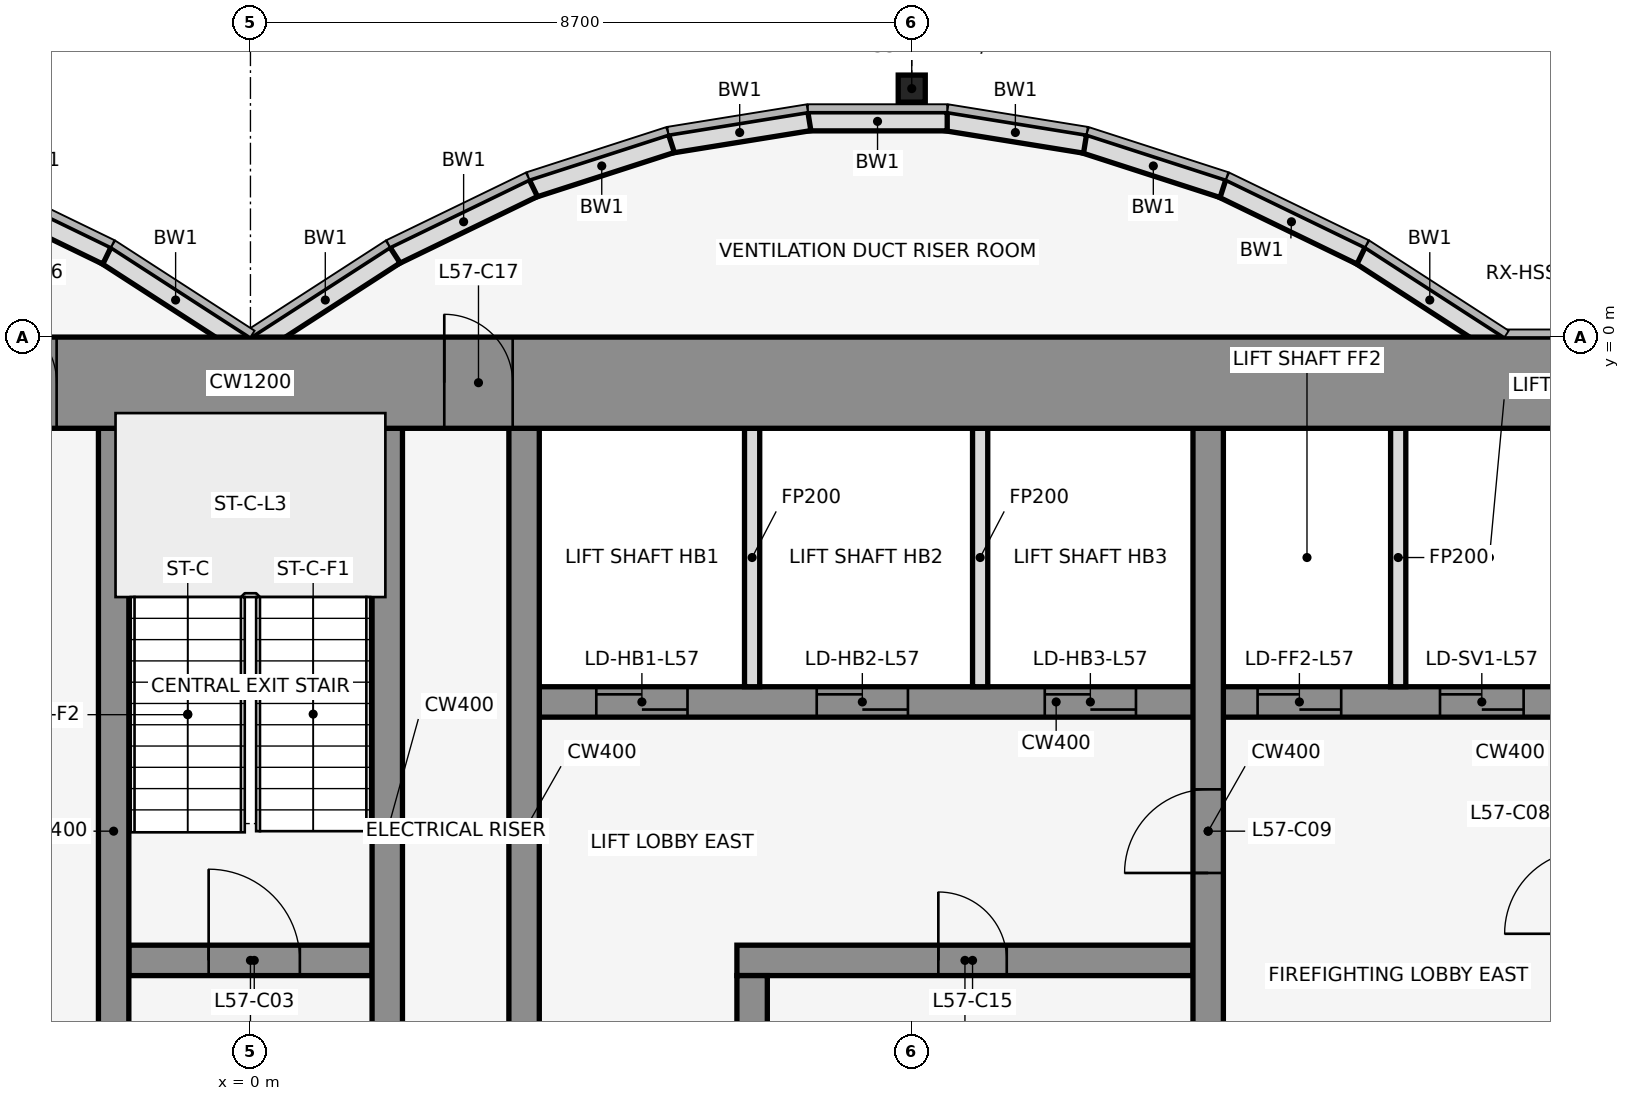
"""IFC4 building model, lengths in metres.
Left out: names, types, materials, properties, quantities, classifications, styles, units other than length and angle.
Written with IfcOpenShell. Run it as: python <this file> out.ifc"""

import sys

from ifc_helpers import new_model, si_unit, direction, frame, frame_2d, origin, origin_2d, place, context, subcontext, project, spatial, rectangle, hollow_rectangle, extrude, element, fill, save


model = new_model("IFC4")
c1 = context("Model", 3, precision=1e-05, world=origin(), true_north=direction((0.0, 1.0)))
c2 = subcontext(c1, "Body", "Model", "MODEL_VIEW")
j1 = project(units=[si_unit("LENGTHUNIT", "METRE"), si_unit("PLANEANGLEUNIT", "RADIAN")], contexts=[c1])
p1 = place(None, origin())
s1 = spatial("IfcSite", under=j1, at=p1, CompositionType="ELEMENT")
p2 = place(p1, origin())
s2 = spatial("IfcBuilding", under=s1, at=p2, CompositionType="ELEMENT")
p3 = place(p2, frame((0.0, 0.0, 254.0)))
s3 = spatial("IfcBuildingStorey", under=s2, at=p3, CompositionType="ELEMENT", Elevation=254.0)
p4 = place(p3, frame((8.7, 3.269, 0.0), z_axis=(0.0, 0.0, 1.0), x_axis=(1.0, 0.0, 0.0)))
e1 = element("IfcColumn", 1, at=p4, inside=s3, PredefinedType="COLUMN", context=c2, shape_type="SweptSolid", body=[
    extrude(hollow_rectangle(XDim=0.356, YDim=0.356, WallThickness=0.012, at=origin_2d()), origin(), (0.0, 0.0, 1.0), 4.2),
])
p5 = place(p3, frame((16.432, -0.105, 0.0), z_axis=(0.0, 0.0, 1.0), x_axis=(-0.83981312244, 0.542875602121, 0.0)))
e2 = element("IfcWall", 2, at=p5, inside=s3, PredefinedType="STANDARD", context=c2, shape_type="SweptSolid", body=[
    extrude(rectangle(XDim=2.183, YDim=0.25, at=frame_2d((1.091, 0.0))), origin(), (0.0, 0.0, 1.0), 4.05),
])
p6 = place(p3, frame((14.612, 1.073, 0.0), z_axis=(0.0, 0.0, 1.0), x_axis=(-0.89982408427, 0.436252928206, 0.0)))
e3 = element("IfcWall", 3, at=p6, inside=s3, PredefinedType="STANDARD", context=c2, shape_type="SweptSolid", body=[
    extrude(rectangle(XDim=2.038, YDim=0.25, at=frame_2d((1.019, 0.0))), origin(), (0.0, 0.0, 1.0), 4.05),
])
p7 = place(p3, frame((12.795, 1.955, 0.0), z_axis=(0.0, 0.0, 1.0), x_axis=(-0.951495806175, 0.307661714928, 0.0)))
e4 = element("IfcWall", 4, at=p7, inside=s3, PredefinedType="STANDARD", context=c2, shape_type="SweptSolid", body=[
    extrude(rectangle(XDim=1.927, YDim=0.25, at=frame_2d((0.963, 0.0))), origin(), (0.0, 0.0, 1.0), 4.05),
])
p8 = place(p3, frame((10.98, 2.543, 0.0), z_axis=(0.0, 0.0, 1.0), x_axis=(-0.987181718931, 0.159600293885, 0.0)))
e5 = element("IfcWall", 5, at=p8, inside=s3, PredefinedType="STANDARD", context=c2, shape_type="SweptSolid", body=[
    extrude(rectangle(XDim=1.857, YDim=0.25, at=frame_2d((0.929, 0.0))), origin(), (0.0, 0.0, 1.0), 4.05),
])
p9 = place(p3, frame((9.167, 2.838, 0.0), z_axis=(0.0, 0.0, 1.0), x_axis=(-1.0, 0.0, 0.0)))
e6 = element("IfcWall", 6, at=p9, inside=s3, PredefinedType="STANDARD", context=c2, shape_type="SweptSolid", body=[
    extrude(rectangle(XDim=1.833, YDim=0.25, at=frame_2d((0.917, 0.0))), origin(), (0.0, 0.0, 1.0), 4.05),
])
p10 = place(p3, frame((7.353, 2.84, 0.0), z_axis=(0.0, 0.0, 1.0), x_axis=(-0.987181718931, -0.159600293885, 0.0)))
e7 = element("IfcWall", 7, at=p10, inside=s3, PredefinedType="STANDARD", context=c2, shape_type="SweptSolid", body=[
    extrude(rectangle(XDim=1.857, YDim=0.25, at=frame_2d((0.929, 0.0))), origin(), (0.0, 0.0, 1.0), 4.05),
])
p11 = place(p3, frame((5.538, 2.548, 0.0), z_axis=(0.0, 0.0, 1.0), x_axis=(-0.951495806175, -0.307661714928, 0.0)))
e8 = element("IfcWall", 8, at=p11, inside=s3, PredefinedType="STANDARD", context=c2, shape_type="SweptSolid", body=[
    extrude(rectangle(XDim=1.927, YDim=0.25, at=frame_2d((0.963, 0.0))), origin(), (0.0, 0.0, 1.0), 4.05),
])
p12 = place(p3, frame((3.721, 1.962, 0.0), z_axis=(0.0, 0.0, 1.0), x_axis=(-0.89982408427, -0.436252928206, 0.0)))
e9 = element("IfcWall", 9, at=p12, inside=s3, PredefinedType="STANDARD", context=c2, shape_type="SweptSolid", body=[
    extrude(rectangle(XDim=2.038, YDim=0.25, at=frame_2d((1.019, 0.0))), origin(), (0.0, 0.0, 1.0), 4.05),
])
for number, where, z_axis, x_axis in (
    (10, (1.901, 1.08, 0.0), (0.0, 0.0, 1.0), (-0.84, -0.543, 0.0)),
    (11, (-0.068, -0.105, 0.0), (0.0, 0.0, 1.0), (-0.84, 0.543, 0.0)),
):
    element("IfcWall", number, at=place(p3, frame(where, z_axis=z_axis, x_axis=x_axis)), inside=s3, PredefinedType="STANDARD", context=c2, shape_type="SweptSolid", body=[
        extrude(rectangle(XDim=2.183, YDim=0.25, at=frame_2d((1.091, 0.0))), origin(), (0.0, 0.0, 1.0), 4.05),
    ])
p13 = place(p3, frame((-1.888, 1.073, 0.0), z_axis=(0.0, 0.0, 1.0), x_axis=(-0.89982408427, 0.436252928206, 0.0)))
e12 = element("IfcWall", 12, at=p13, inside=s3, PredefinedType="STANDARD", context=c2, shape_type="SweptSolid", body=[
    extrude(rectangle(XDim=2.038, YDim=0.25, at=frame_2d((1.019, 0.0))), origin(), (0.0, 0.0, 1.0), 4.05),
])
p14 = place(p3, frame((-1.6, -8.2, 0.0), z_axis=(0.0, 0.0, 1.0), x_axis=(1.0, 0.0, 0.0)))
e13 = element("IfcWall", 13, at=p14, inside=s3, PredefinedType="SHEAR", context=c2, shape_type="SweptSolid", body=[
    extrude(rectangle(XDim=3.2, YDim=0.4, at=frame_2d((1.6, 0.0))), origin(), (0.0, 0.0, 1.0), 4.2),
])
p15 = place(p14, frame((1.05, 0.0, 0.0)))
e14 = element("IfcOpeningElement", 14, at=p15, cuts=e13, PredefinedType="OPENING", context=c2, shape_type="SweptSolid", body=[
    extrude(rectangle(XDim=1.2, YDim=2.1, at=frame_2d((0.6, 1.05))), frame((0.0, 0.212, 0.0), z_axis=(0.0, -1.0, 0.0), x_axis=(1.0, 0.0, 0.0)), (0.0, 0.0, 1.0), 0.424),
])
p16 = place(p3, frame((6.4, -8.2, 0.0), z_axis=(0.0, 0.0, 1.0), x_axis=(1.0, 0.0, 0.0)))
e15 = element("IfcWall", 15, at=p16, inside=s3, PredefinedType="SHEAR", context=c2, shape_type="SweptSolid", body=[
    extrude(rectangle(XDim=6.0, YDim=0.4, at=frame_2d((3.0, 0.0))), origin(), (0.0, 0.0, 1.0), 4.2),
])
p17 = place(p16, frame((2.65, 0.0, 0.0)))
e16 = element("IfcOpeningElement", 16, at=p17, cuts=e15, PredefinedType="OPENING", context=c2, shape_type="SweptSolid", body=[
    extrude(rectangle(XDim=0.9, YDim=2.1, at=frame_2d((0.45, 1.05))), frame((0.0, 0.212, 0.0), z_axis=(0.0, -1.0, 0.0), x_axis=(1.0, 0.0, 0.0)), (0.0, 0.0, 1.0), 0.424),
])
p18 = place(p3, frame((3.8, -4.8, 0.0), z_axis=(0.0, 0.0, 1.0), x_axis=(1.0, 0.0, 0.0)))
e17 = element("IfcWall", 17, at=p18, inside=s3, PredefinedType="SHEAR", context=c2, shape_type="SweptSolid", body=[
    extrude(rectangle(XDim=13.6, YDim=0.4, at=frame_2d((6.8, 0.0))), origin(), (0.0, 0.0, 1.0), 4.2),
])
p19 = place(p18, frame((0.75, 0.0, 0.0)))
e18 = element("IfcOpeningElement", 18, at=p19, cuts=e17, PredefinedType="OPENING", context=c2, shape_type="SweptSolid", body=[
    extrude(rectangle(XDim=1.2, YDim=2.1, at=frame_2d((0.6, 1.05))), frame((0.0, 0.212, 0.0), z_axis=(0.0, -1.0, 0.0), x_axis=(1.0, 0.0, 0.0)), (0.0, 0.0, 1.0), 0.424),
])
p20 = place(p18, frame((3.65, 0.0, 0.0)))
e19 = element("IfcOpeningElement", 19, at=p20, cuts=e17, PredefinedType="OPENING", context=c2, shape_type="SweptSolid", body=[
    extrude(rectangle(XDim=1.2, YDim=2.1, at=frame_2d((0.6, 1.05))), frame((0.0, 0.212, 0.0), z_axis=(0.0, -1.0, 0.0), x_axis=(1.0, 0.0, 0.0)), (0.0, 0.0, 1.0), 0.424),
])
p21 = place(p18, frame((6.65, 0.0, 0.0)))
e20 = element("IfcOpeningElement", 20, at=p21, cuts=e17, PredefinedType="OPENING", context=c2, shape_type="SweptSolid", body=[
    extrude(rectangle(XDim=1.2, YDim=2.1, at=frame_2d((0.6, 1.05))), frame((0.0, 0.212, 0.0), z_axis=(0.0, -1.0, 0.0), x_axis=(1.0, 0.0, 0.0)), (0.0, 0.0, 1.0), 0.424),
])
p22 = place(p18, frame((9.45, 0.0, 0.0)))
e21 = element("IfcOpeningElement", 21, at=p22, cuts=e17, PredefinedType="OPENING", context=c2, shape_type="SweptSolid", body=[
    extrude(rectangle(XDim=1.1, YDim=2.1, at=frame_2d((0.55, 1.05))), frame((0.0, 0.212, 0.0), z_axis=(0.0, -1.0, 0.0), x_axis=(1.0, 0.0, 0.0)), (0.0, 0.0, 1.0), 0.424),
])
p23 = place(p18, frame((11.85, 0.0, 0.0)))
e22 = element("IfcOpeningElement", 22, at=p23, cuts=e17, PredefinedType="OPENING", context=c2, shape_type="SweptSolid", body=[
    extrude(rectangle(XDim=1.1, YDim=2.1, at=frame_2d((0.55, 1.05))), frame((0.0, 0.212, 0.0), z_axis=(0.0, -1.0, 0.0), x_axis=(1.0, 0.0, 0.0)), (0.0, 0.0, 1.0), 0.424),
])
for number, where, z_axis, x_axis in (
    (23, (-1.8, -11.8, 0.0), (0.0, 0.0, 1.0), (0.0, 1.0, 0.0)),
    (24, (1.8, -11.8, 0.0), (0.0, 0.0, 1.0), (0.0, 1.0, 0.0)),
):
    element("IfcWall", number, at=place(p3, frame(where, z_axis=z_axis, x_axis=x_axis)), inside=s3, PredefinedType="SHEAR", context=c2, shape_type="SweptSolid", body=[
        extrude(rectangle(XDim=10.6, YDim=0.4, at=frame_2d((5.3, 0.0))), origin(), (0.0, 0.0, 1.0), 4.2),
    ])
p24 = place(p3, frame((3.6, -11.8, 0.0), z_axis=(0.0, 0.0, 1.0), x_axis=(0.0, 1.0, 0.0)))
e25 = element("IfcWall", 25, at=p24, inside=s3, PredefinedType="SHEAR", context=c2, shape_type="SweptSolid", body=[
    extrude(rectangle(XDim=10.6, YDim=0.4, at=frame_2d((5.3, 0.0))), origin(), (0.0, 0.0, 1.0), 4.2),
])
p25 = place(p24, frame((1.35, 0.0, 0.0)))
e26 = element("IfcOpeningElement", 26, at=p25, cuts=e25, PredefinedType="OPENING", context=c2, shape_type="SweptSolid", body=[
    extrude(rectangle(XDim=0.9, YDim=2.1, at=frame_2d((0.45, 1.05))), frame((0.0, 0.212, 0.0), z_axis=(0.0, -1.0, 0.0), x_axis=(1.0, 0.0, 0.0)), (0.0, 0.0, 1.0), 0.424),
])
p26 = place(p3, frame((6.6, -11.8, 0.0), z_axis=(0.0, 0.0, 1.0), x_axis=(0.0, 1.0, 0.0)))
e27 = element("IfcWall", 27, at=p26, inside=s3, PredefinedType="SHEAR", context=c2, shape_type="SweptSolid", body=[
    extrude(rectangle(XDim=3.4, YDim=0.4, at=frame_2d((1.7, 0.0))), origin(), (0.0, 0.0, 1.0), 4.2),
])
for number, where, z_axis, x_axis in (
    (28, (6.6, -4.6, 0.0), (0.0, 0.0, 1.0), (0.0, 1.0, 0.0)),
    (29, (9.6, -4.6, 0.0), (0.0, 0.0, 1.0), (0.0, 1.0, 0.0)),
):
    element("IfcWall", number, at=place(p3, frame(where, z_axis=z_axis, x_axis=x_axis)), inside=s3, PredefinedType="PARTITIONING", context=c2, shape_type="SweptSolid", body=[
        extrude(rectangle(XDim=3.4, YDim=0.2, at=frame_2d((1.7, 0.0))), origin(), (0.0, 0.0, 1.0), 3.118),
    ])
p27 = place(p3, frame((12.6, -11.8, 0.0), z_axis=(0.0, 0.0, 1.0), x_axis=(0.0, 1.0, 0.0)))
e30 = element("IfcWall", 30, at=p27, inside=s3, PredefinedType="SHEAR", context=c2, shape_type="SweptSolid", body=[
    extrude(rectangle(XDim=10.6, YDim=0.4, at=frame_2d((5.3, 0.0))), origin(), (0.0, 0.0, 1.0), 4.2),
])
p28 = place(p27, frame((4.75, 0.0, 0.0)))
e31 = element("IfcOpeningElement", 31, at=p28, cuts=e30, PredefinedType="OPENING", context=c2, shape_type="SweptSolid", body=[
    extrude(rectangle(XDim=1.1, YDim=2.1, at=frame_2d((0.55, 1.05))), frame((0.0, 0.212, 0.0), z_axis=(0.0, -1.0, 0.0), x_axis=(1.0, 0.0, 0.0)), (0.0, 0.0, 1.0), 0.424),
])
p29 = place(p3, frame((15.1, -4.6, 0.0), z_axis=(0.0, 0.0, 1.0), x_axis=(0.0, 1.0, 0.0)))
e32 = element("IfcWall", 32, at=p29, inside=s3, PredefinedType="PARTITIONING", context=c2, shape_type="SweptSolid", body=[
    extrude(rectangle(XDim=3.4, YDim=0.2, at=frame_2d((1.7, 0.0))), origin(), (0.0, 0.0, 1.0), 3.118),
])
p30 = place(p3, frame((-22.0, -0.6, 0.0), z_axis=(0.0, 0.0, 1.0), x_axis=(1.0, 0.0, 0.0)))
e33 = element("IfcWall", 33, at=p30, inside=s3, PredefinedType="SHEAR", context=c2, shape_type="SweptSolid", body=[
    extrude(rectangle(XDim=44.0, YDim=1.2, at=frame_2d((22.0, 0.0))), origin(), (0.0, 0.0, 1.0), 4.2),
])
p31 = place(p30, frame((18.55, 0.0, 0.0)))
e34 = element("IfcOpeningElement", 34, at=p31, cuts=e33, PredefinedType="OPENING", context=c2, shape_type="SweptSolid", body=[
    extrude(rectangle(XDim=0.9, YDim=2.1, at=frame_2d((0.45, 1.05))), frame((0.0, 0.612, 0.0), z_axis=(0.0, -1.0, 0.0), x_axis=(1.0, 0.0, 0.0)), (0.0, 0.0, 1.0), 1.224),
])
p32 = place(p30, frame((24.55, 0.0, 0.0)))
e35 = element("IfcOpeningElement", 35, at=p32, cuts=e33, PredefinedType="OPENING", context=c2, shape_type="SweptSolid", body=[
    extrude(rectangle(XDim=0.9, YDim=2.1, at=frame_2d((0.45, 1.05))), frame((0.0, 0.612, 0.0), z_axis=(0.0, -1.0, 0.0), x_axis=(1.0, 0.0, 0.0)), (0.0, 0.0, 1.0), 1.224),
])
p33 = place(p15, origin())
e36 = element("IfcDoor", 36, at=p33, inside=s3, OperationType="SINGLE_SWING_LEFT", PredefinedType="DOOR", context=c2, shape_type="SweptSolid", body=[
    extrude(rectangle(XDim=1.2, YDim=2.1, at=frame_2d((0.6, 1.05))), frame((0.0, 0.025, 0.0), z_axis=(0.0, -1.0, 0.0), x_axis=(1.0, 0.0, 0.0)), (0.0, 0.0, 1.0), 0.05),
])
fill(e14, e36)
p34 = place(p19, origin())
e37 = element("IfcDoor", 37, at=p34, inside=s3, OperationType="DOUBLE_DOOR_SLIDING", PredefinedType="DOOR", context=c2, shape_type="SweptSolid", body=[
    extrude(rectangle(XDim=1.2, YDim=2.1, at=frame_2d((0.6, 1.05))), frame((0.0, 0.025, 0.0), z_axis=(0.0, -1.0, 0.0), x_axis=(1.0, 0.0, 0.0)), (0.0, 0.0, 1.0), 0.05),
])
fill(e18, e37)
p35 = place(p20, origin())
e38 = element("IfcDoor", 38, at=p35, inside=s3, OperationType="DOUBLE_DOOR_SLIDING", PredefinedType="DOOR", context=c2, shape_type="SweptSolid", body=[
    extrude(rectangle(XDim=1.2, YDim=2.1, at=frame_2d((0.6, 1.05))), frame((0.0, 0.025, 0.0), z_axis=(0.0, -1.0, 0.0), x_axis=(1.0, 0.0, 0.0)), (0.0, 0.0, 1.0), 0.05),
])
fill(e19, e38)
p36 = place(p21, origin())
e39 = element("IfcDoor", 39, at=p36, inside=s3, OperationType="DOUBLE_DOOR_SLIDING", PredefinedType="DOOR", context=c2, shape_type="SweptSolid", body=[
    extrude(rectangle(XDim=1.2, YDim=2.1, at=frame_2d((0.6, 1.05))), frame((0.0, 0.025, 0.0), z_axis=(0.0, -1.0, 0.0), x_axis=(1.0, 0.0, 0.0)), (0.0, 0.0, 1.0), 0.05),
])
fill(e20, e39)
p37 = place(p22, origin())
e40 = element("IfcDoor", 40, at=p37, inside=s3, OperationType="DOUBLE_DOOR_SLIDING", PredefinedType="DOOR", context=c2, shape_type="SweptSolid", body=[
    extrude(rectangle(XDim=1.1, YDim=2.1, at=frame_2d((0.55, 1.05))), frame((0.0, 0.025, 0.0), z_axis=(0.0, -1.0, 0.0), x_axis=(1.0, 0.0, 0.0)), (0.0, 0.0, 1.0), 0.05),
])
fill(e21, e40)
p38 = place(p23, origin())
e41 = element("IfcDoor", 41, at=p38, inside=s3, OperationType="DOUBLE_DOOR_SLIDING", PredefinedType="DOOR", context=c2, shape_type="SweptSolid", body=[
    extrude(rectangle(XDim=1.1, YDim=2.1, at=frame_2d((0.55, 1.05))), frame((0.0, 0.025, 0.0), z_axis=(0.0, -1.0, 0.0), x_axis=(1.0, 0.0, 0.0)), (0.0, 0.0, 1.0), 0.05),
])
fill(e22, e41)
p39 = place(p28, frame((1.1, 0.0, 0.0), z_axis=(0.0, 0.0, 1.0), x_axis=(-1.0, 0.0, 0.0)))
e42 = element("IfcDoor", 42, at=p39, inside=s3, OperationType="SINGLE_SWING_RIGHT", PredefinedType="DOOR", context=c2, shape_type="SweptSolid", body=[
    extrude(rectangle(XDim=1.1, YDim=2.1, at=frame_2d((0.55, 1.05))), frame((0.0, 0.025, 0.0), z_axis=(0.0, -1.0, 0.0), x_axis=(1.0, 0.0, 0.0)), (0.0, 0.0, 1.0), 0.05),
])
fill(e31, e42)
p40 = place(p17, frame((0.9, 0.0, 0.0), z_axis=(0.0, 0.0, 1.0), x_axis=(-1.0, 0.0, 0.0)))
e43 = element("IfcDoor", 43, at=p40, inside=s3, OperationType="SINGLE_SWING_RIGHT", PredefinedType="DOOR", context=c2, shape_type="SweptSolid", body=[
    extrude(rectangle(XDim=0.9, YDim=2.1, at=frame_2d((0.45, 1.05))), frame((0.0, 0.025, 0.0), z_axis=(0.0, -1.0, 0.0), x_axis=(1.0, 0.0, 0.0)), (0.0, 0.0, 1.0), 0.05),
])
fill(e16, e43)
p41 = place(p31, origin())
e44 = element("IfcDoor", 44, at=p41, inside=s3, OperationType="SINGLE_SWING_LEFT", PredefinedType="DOOR", context=c2, shape_type="SweptSolid", body=[
    extrude(rectangle(XDim=0.9, YDim=2.1, at=frame_2d((0.45, 1.05))), frame((0.0, 0.025, 0.0), z_axis=(0.0, -1.0, 0.0), x_axis=(1.0, 0.0, 0.0)), (0.0, 0.0, 1.0), 0.05),
])
fill(e34, e44)
p42 = place(p32, origin())
e45 = element("IfcDoor", 45, at=p42, inside=s3, OperationType="SINGLE_SWING_LEFT", PredefinedType="DOOR", context=c2, shape_type="SweptSolid", body=[
    extrude(rectangle(XDim=0.9, YDim=2.1, at=frame_2d((0.45, 1.05))), frame((0.0, 0.025, 0.0), z_axis=(0.0, -1.0, 0.0), x_axis=(1.0, 0.0, 0.0)), (0.0, 0.0, 1.0), 0.05),
])
fill(e35, e45)
save(model, sys.argv[1])
